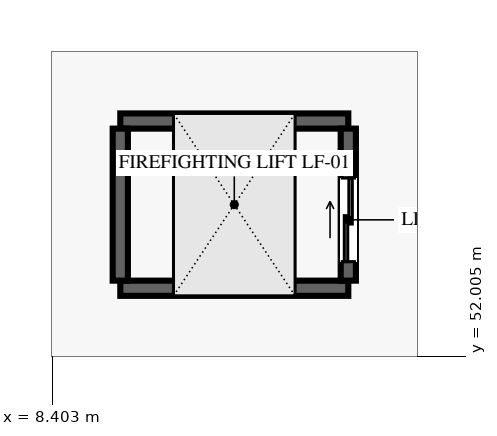
"""IFC4 building model, lengths in metres.
Left out: names, types, materials, properties, quantities, classifications, styles, units other than length and angle.
Written with IfcOpenShell. Run it as: python <this file> out.ifc"""

import sys

from ifc_helpers import new_model, si_unit, direction, frame, frame_2d, origin, place, context, subcontext, project, spatial, rectangle, extrude, element, fill, save


model = new_model("IFC4")
c1 = context("Model", 3, precision=1e-05, world=origin(), true_north=direction((0.0, 1.0)))
c2 = subcontext(c1, "Body", "Model", "MODEL_VIEW")
j1 = project(units=[si_unit("LENGTHUNIT", "METRE"), si_unit("PLANEANGLEUNIT", "RADIAN")], contexts=[c1])
p1 = place(None, origin())
s1 = spatial("IfcSite", under=j1, at=p1, CompositionType="ELEMENT")
p2 = place(p1, origin())
s2 = spatial("IfcBuilding", under=s1, at=p2, CompositionType="ELEMENT")
p3 = place(p2, origin())
s3 = spatial("IfcBuildingStorey", under=s2, at=p3, CompositionType="ELEMENT", Elevation=0.0)
for number, where, z_axis, x_axis in (
    (1, (9.3, 52.9, 0.0), (0.0, 0.0, 1.0), (1.0, 0.0, 0.0)),
    (2, (9.3, 55.1, 0.0), (0.0, 0.0, 1.0), (1.0, 0.0, 0.0)),
):
    element("IfcWall", number, at=place(p3, frame(where, z_axis=z_axis, x_axis=x_axis)), inside=s3, PredefinedType="SHEAR", context=c2, shape_type="SweptSolid", body=[
        extrude(rectangle(XDim=3.0, YDim=0.2, at=frame_2d((1.5, 0.0))), origin(), (0.0, 0.0, 1.0), 5.16),
    ])
p4 = place(p3, frame((9.3, 53.0, 0.0), z_axis=(0.0, 0.0, 1.0), x_axis=(0.0, 1.0, 0.0)))
e3 = element("IfcWall", 3, at=p4, inside=s3, PredefinedType="SHEAR", context=c2, shape_type="SweptSolid", body=[
    extrude(rectangle(XDim=2.0, YDim=0.2, at=frame_2d((1.0, 0.0))), origin(), (0.0, 0.0, 1.0), 5.16),
])
p5 = place(p3, frame((12.3, 53.0, 0.0), z_axis=(0.0, 0.0, 1.0), x_axis=(0.0, 1.0, 0.0)))
e4 = element("IfcWall", 4, at=p5, inside=s3, PredefinedType="SHEAR", context=c2, shape_type="SweptSolid", body=[
    extrude(rectangle(XDim=2.0, YDim=0.2, at=frame_2d((1.0, 0.0))), origin(), (0.0, 0.0, 1.0), 5.16),
])
p6 = place(p5, frame((0.25, 0.0, 0.0)))
e5 = element("IfcOpeningElement", 5, at=p6, cuts=e4, PredefinedType="OPENING", context=c2, shape_type="SweptSolid", body=[
    extrude(rectangle(XDim=1.1, YDim=2.15, at=frame_2d((0.55, 1.075))), frame((0.0, 0.11, 0.0), z_axis=(0.0, -1.0, 0.0), x_axis=(1.0, 0.0, 0.0)), (0.0, 0.0, 1.0), 0.22),
])
p7 = place(p6, origin())
e6 = element("IfcDoor", 6, at=p7, inside=s3, OperationType="DOUBLE_DOOR_SLIDING", PredefinedType="DOOR", context=c2, shape_type="SweptSolid", body=[
    extrude(rectangle(XDim=1.1, YDim=2.15, at=frame_2d((0.55, 1.075))), frame((0.0, 0.025, 0.0), z_axis=(0.0, -1.0, 0.0), x_axis=(1.0, 0.0, 0.0)), (0.0, 0.0, 1.0), 0.05),
])
fill(e5, e6)
save(model, sys.argv[1])
